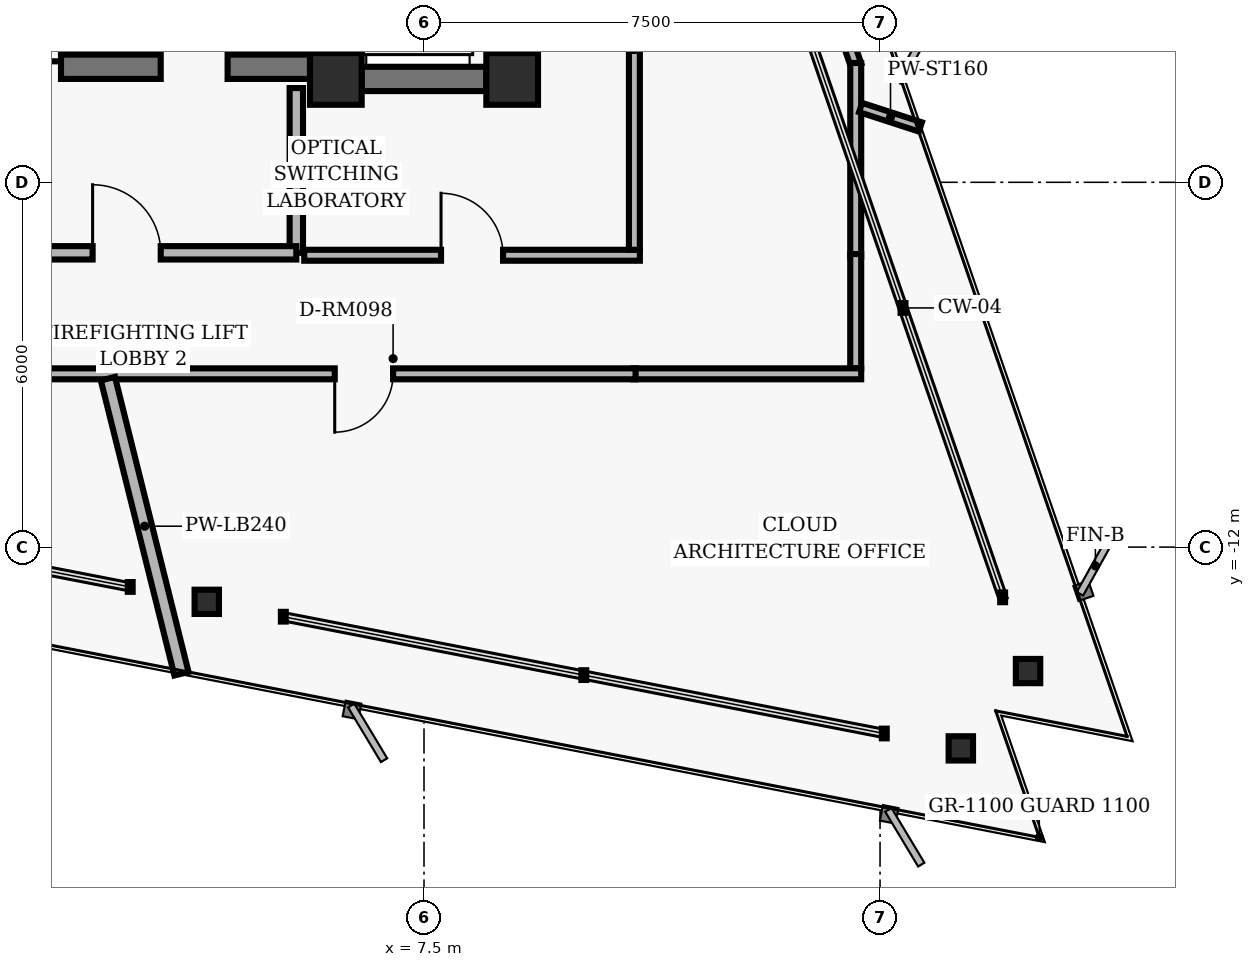
"""IFC4 building model, lengths in metres.
Left out: names, types, materials, properties, quantities, classifications, styles, units other than length and angle.
Written with IfcOpenShell. Run it as: python <this file> out.ifc"""

import sys

from ifc_helpers import new_model, si_unit, direction, frame, frame_2d, origin, origin_2d, place, context, subcontext, project, spatial, rectangle, hollow_rectangle, i_section, extrude, element, fill, save


model = new_model("IFC4")
c1 = context("Model", 3, precision=1e-05, world=origin(), true_north=direction((0.0, 1.0)))
c2 = subcontext(c1, "Body", "Model", "MODEL_VIEW")
j1 = project(units=[si_unit("LENGTHUNIT", "METRE"), si_unit("PLANEANGLEUNIT", "RADIAN")], contexts=[c1])
p1 = place(None, origin())
s1 = spatial("IfcSite", under=j1, at=p1, CompositionType="ELEMENT")
p2 = place(p1, origin())
s2 = spatial("IfcBuilding", under=s1, at=p2, CompositionType="ELEMENT")
p3 = place(p2, frame((0.0, 0.0, 147.2)))
s3 = spatial("IfcBuildingStorey", under=s2, at=p3, CompositionType="ELEMENT", Elevation=147.2)
for number, where, z_axis, x_axis in (
    (1, (6.05, -4.3, 0.0), (0.0, 0.0, 1.0), (1.0, 0.0, 0.0)),
    (2, (8.95, -4.3, 0.0), (0.0, 0.0, 1.0), (1.0, 0.0, 0.0)),
):
    element("IfcColumn", number, at=place(p3, frame(where, z_axis=z_axis, x_axis=x_axis)), inside=s3, PredefinedType="COLUMN", context=c2, shape_type="SweptSolid", body=[
        extrude(hollow_rectangle(XDim=0.85, YDim=0.85, WallThickness=0.055, InnerFilletRadius=0.02, OuterFilletRadius=0.04, at=origin_2d()), origin(), (0.0, 0.0, 1.0), 3.04),
    ])
p4 = place(p3, frame((6.05, -3.875, 0.0), z_axis=(0.0, 0.0, 1.0), x_axis=(0.0, 1.0, 0.0)))
e3 = element("IfcWall", 3, at=p4, inside=s3, PredefinedType="SHEAR", context=c2, shape_type="SweptSolid", body=[
    extrude(rectangle(XDim=3.45, YDim=0.6, at=frame_2d((1.725, 0.0))), origin(), (0.0, 0.0, 1.0), 2.788),
])
p5 = place(p3, frame((1.94, -4.1, 0.0), z_axis=(0.0, 0.0, 1.0), x_axis=(0.0, 1.0, 0.0)))
e4 = element("IfcWall", 4, at=p5, inside=s3, PredefinedType="SHEAR", context=c2, shape_type="SweptSolid", body=[
    extrude(rectangle(XDim=8.2, YDim=0.35, at=frame_2d((4.1, 0.0))), origin(), (0.0, 0.0, 1.0), 2.788),
])
p6 = place(p3, frame((-5.625, -4.1, 0.0), z_axis=(0.0, 0.0, 1.0), x_axis=(1.0, 0.0, 0.0)))
e5 = element("IfcWall", 5, at=p6, inside=s3, PredefinedType="SHEAR", context=c2, shape_type="SweptSolid", body=[
    extrude(rectangle(XDim=11.25, YDim=0.4, at=frame_2d((5.625, 0.0))), origin(), (0.0, 0.0, 1.0), 2.788),
])
p7 = place(p6, frame((1.355, 0.0, 0.0)))
e6 = element("IfcOpeningElement", 6, at=p7, cuts=e5, PredefinedType="OPENING", context=c2, shape_type="SweptSolid", body=[
    extrude(rectangle(XDim=1.1, YDim=2.04, at=frame_2d((0.55, 1.02))), frame((0.0, 0.21, 0.0), z_axis=(0.0, -1.0, 0.0), x_axis=(1.0, 0.0, 0.0)), (0.0, 0.0, 1.0), 0.42),
])
p8 = place(p6, frame((8.795, 0.0, 0.0)))
e7 = element("IfcOpeningElement", 7, at=p8, cuts=e5, PredefinedType="OPENING", context=c2, shape_type="SweptSolid", body=[
    extrude(rectangle(XDim=1.1, YDim=2.04, at=frame_2d((0.55, 1.02))), frame((0.0, 0.21, 0.0), z_axis=(0.0, -1.0, 0.0), x_axis=(1.0, 0.0, 0.0)), (0.0, 0.0, 1.0), 0.42),
])
p9 = place(p6, frame((4.095, 0.0, 0.0)))
e8 = element("IfcOpeningElement", 8, at=p9, cuts=e5, PredefinedType="OPENING", context=c2, shape_type="SweptSolid", body=[
    extrude(rectangle(XDim=1.06, YDim=2.04, at=frame_2d((0.53, 1.02))), frame((0.0, 0.21, 0.0), z_axis=(0.0, -1.0, 0.0), x_axis=(1.0, 0.0, 0.0)), (0.0, 0.0, 1.0), 0.42),
])
p10 = place(p6, frame((6.095, 0.0, 0.0)))
e9 = element("IfcOpeningElement", 9, at=p10, cuts=e5, PredefinedType="OPENING", context=c2, shape_type="SweptSolid", body=[
    extrude(rectangle(XDim=1.06, YDim=2.04, at=frame_2d((0.53, 1.02))), frame((0.0, 0.21, 0.0), z_axis=(0.0, -1.0, 0.0), x_axis=(1.0, 0.0, 0.0)), (0.0, 0.0, 1.0), 0.42),
])
p11 = place(p3, frame((8.95, -3.875, 0.0), z_axis=(0.0, 0.0, 1.0), x_axis=(0.0, 1.0, 0.0)))
e10 = element("IfcWall", 10, at=p11, inside=s3, PredefinedType="SHEAR", context=c2, shape_type="SweptSolid", body=[
    extrude(rectangle(XDim=7.95, YDim=0.6, at=frame_2d((3.975, 0.0))), origin(), (0.0, 0.0, 1.0), 2.788),
])
p12 = place(p11, frame((0.55, 0.0, 0.0)))
e11 = element("IfcOpeningElement", 11, at=p12, cuts=e10, PredefinedType="OPENING", context=c2, shape_type="SweptSolid", body=[
    extrude(rectangle(XDim=1.06, YDim=2.04, at=frame_2d((0.53, 1.02))), frame((0.0, 0.31, 0.0), z_axis=(0.0, -1.0, 0.0), x_axis=(1.0, 0.0, 0.0)), (0.0, 0.0, 1.0), 0.62),
])
p13 = place(p11, frame((3.445, 0.0, 0.0)))
e12 = element("IfcOpeningElement", 12, at=p13, cuts=e10, PredefinedType="OPENING", context=c2, shape_type="SweptSolid", body=[
    extrude(rectangle(XDim=1.06, YDim=2.04, at=frame_2d((0.53, 1.02))), frame((0.0, 0.31, 0.0), z_axis=(0.0, -1.0, 0.0), x_axis=(1.0, 0.0, 0.0)), (0.0, 0.0, 1.0), 0.62),
])
p14 = place(p11, frame((6.33, 0.0, 0.0)))
e13 = element("IfcOpeningElement", 13, at=p14, cuts=e10, PredefinedType="OPENING", context=c2, shape_type="SweptSolid", body=[
    extrude(rectangle(XDim=1.06, YDim=2.04, at=frame_2d((0.53, 1.02))), frame((0.0, 0.31, 0.0), z_axis=(0.0, -1.0, 0.0), x_axis=(1.0, 0.0, 0.0)), (0.0, 0.0, 1.0), 0.62),
])
p15 = place(p3, frame((6.475, -4.3, 0.0), z_axis=(0.0, 0.0, 1.0), x_axis=(1.0, 0.0, 0.0)))
e14 = element("IfcWall", 14, at=p15, inside=s3, PredefinedType="SHEAR", context=c2, shape_type="SweptSolid", body=[
    extrude(rectangle(XDim=2.05, YDim=0.4, at=frame_2d((1.025, 0.0))), origin(), (0.0, 0.0, 1.0), 2.788),
])
for number, where, z_axis, x_axis in (
    (15, (17.434, -14.039, 0.0), (0.0, 0.0, 1.0), (1.0, 0.0, 0.0)),
    (16, (3.927, -12.9, 0.0), (0.0, 0.0, 1.0), (1.0, 0.0, 0.0)),
    (17, (16.329, -15.311, 0.0), (0.0, 0.0, 1.0), (1.0, 0.0, 0.0)),
):
    element("IfcColumn", number, at=place(p3, frame(where, z_axis=z_axis, x_axis=x_axis)), inside=s3, PredefinedType="COLUMN", context=c2, shape_type="SweptSolid", body=[
        extrude(i_section(OverallWidth=0.401, OverallDepth=0.399, WebThickness=0.025, FlangeThickness=0.04, FilletRadius=0.018, at=origin_2d()), origin(), (0.0, 0.0, 1.0), 3.04),
    ])
p16 = place(p3, frame((5.4, -7.16, 0.0), z_axis=(0.0, 0.0, 1.0), x_axis=(0.0, 1.0, 0.0)))
e18 = element("IfcWall", 18, at=p16, inside=s3, PredefinedType="PARTITIONING", context=c2, shape_type="SweptSolid", body=[
    extrude(rectangle(XDim=2.71, YDim=0.22, at=frame_2d((1.355, 0.0))), origin(), (0.0, 0.0, 1.0), 2.763),
])
p17 = place(p3, frame((0.0, -7.16, 0.0), z_axis=(0.0, 0.0, 1.0), x_axis=(1.0, 0.0, 0.0)))
e19 = element("IfcWall", 19, at=p17, inside=s3, PredefinedType="PARTITIONING", context=c2, shape_type="SweptSolid", body=[
    extrude(rectangle(XDim=5.4, YDim=0.22, at=frame_2d((2.7, 0.0))), origin(), (0.0, 0.0, 1.0), 2.33),
])
p18 = place(p17, frame((2.05, 0.0, 0.0)))
e20 = element("IfcOpeningElement", 20, at=p18, cuts=e19, PredefinedType="OPENING", context=c2, shape_type="SweptSolid", body=[
    extrude(rectangle(XDim=1.12, YDim=2.02, at=frame_2d((0.56, 1.01))), frame((0.0, 0.12, 0.0), z_axis=(0.0, -1.0, 0.0), x_axis=(1.0, 0.0, 0.0)), (0.0, 0.0, 1.0), 0.24),
])
p19 = place(p3, frame((5.53, -7.2, 0.0), z_axis=(0.0, 0.0, 1.0), x_axis=(1.0, 0.0, 0.0)))
e21 = element("IfcWall", 21, at=p19, inside=s3, PredefinedType="PARTITIONING", context=c2, shape_type="SweptSolid", body=[
    extrude(rectangle(XDim=5.52, YDim=0.18, at=frame_2d((2.76, 0.0))), origin(), (0.0, 0.0, 1.0), 2.33),
])
p20 = place(p19, frame((2.25, 0.0, 0.0)))
e22 = element("IfcOpeningElement", 22, at=p20, cuts=e21, PredefinedType="OPENING", context=c2, shape_type="SweptSolid", body=[
    extrude(rectangle(XDim=1.02, YDim=2.02, at=frame_2d((0.51, 1.01))), frame((0.0, 0.1, 0.0), z_axis=(0.0, -1.0, 0.0), x_axis=(1.0, 0.0, 0.0)), (0.0, 0.0, 1.0), 0.2),
])
p21 = place(p3, frame((10.96, -7.11, 0.0), z_axis=(0.0, 0.0, 1.0), x_axis=(0.0, 1.0, 0.0)))
e23 = element("IfcWall", 23, at=p21, inside=s3, PredefinedType="PARTITIONING", context=c2, shape_type="SweptSolid", body=[
    extrude(rectangle(XDim=3.271, YDim=0.18, at=frame_2d((1.635, 0.0))), origin(), (0.0, 0.0, 1.0), 2.763),
])
p22 = place(p3, frame((10.954, 6.533, 0.0), z_axis=(0.0, 0.0, 1.0), x_axis=(0.325553439946, -0.945523642084, 0.0)))
e24 = element("IfcWall", 24, at=p22, inside=s3, PredefinedType="PARTITIONING", context=c2, shape_type="SweptSolid", body=[
    extrude(rectangle(XDim=11.22, YDim=0.18, at=frame_2d((5.61, 0.0))), origin(), (0.0, 0.0, 1.0), 2.763),
])
p23 = place(p3, frame((14.6, -4.038, 0.0), z_axis=(0.0, 0.0, 1.0), x_axis=(0.0, -1.0, 0.0)))
e25 = element("IfcWall", 25, at=p23, inside=s3, PredefinedType="PARTITIONING", context=c2, shape_type="SweptSolid", body=[
    extrude(rectangle(XDim=3.182, YDim=0.18, at=frame_2d((1.591, 0.0))), origin(), (0.0, 0.0, 1.0), 2.763),
])
p24 = place(p3, frame((14.6, -7.18, 0.0), z_axis=(0.0, 0.0, 1.0), x_axis=(0.0, -1.0, 0.0)))
e26 = element("IfcWall", 26, at=p24, inside=s3, PredefinedType="PARTITIONING", context=c2, shape_type="SweptSolid", body=[
    extrude(rectangle(XDim=1.88, YDim=0.18, at=frame_2d((0.94, 0.0))), origin(), (0.0, 0.0, 1.0), 2.763),
])
p25 = place(p3, frame((14.69, -9.15, 0.0), z_axis=(0.0, 0.0, 1.0), x_axis=(-1.0, 0.0, 0.0)))
e27 = element("IfcWall", 27, at=p25, inside=s3, PredefinedType="PARTITIONING", context=c2, shape_type="SweptSolid", body=[
    extrude(rectangle(XDim=3.75, YDim=0.18, at=frame_2d((1.875, 0.0))), origin(), (0.0, 0.0, 1.0), 2.763),
])
p26 = place(p3, frame((10.98, -9.15, 0.0), z_axis=(0.0, 0.0, 1.0), x_axis=(-1.0, 0.0, 0.0)))
e28 = element("IfcWall", 28, at=p26, inside=s3, PredefinedType="PARTITIONING", context=c2, shape_type="SweptSolid", body=[
    extrude(rectangle(XDim=17.5, YDim=0.18, at=frame_2d((8.75, 0.0))), origin(), (0.0, 0.0, 1.0), 2.33),
])
p27 = place(p26, frame((12.48, 0.0, 0.0)))
e29 = element("IfcOpeningElement", 29, at=p27, cuts=e28, PredefinedType="OPENING", context=c2, shape_type="SweptSolid", body=[
    extrude(rectangle(XDim=0.96, YDim=2.02, at=frame_2d((0.48, 1.01))), frame((0.0, 0.1, 0.0), z_axis=(0.0, -1.0, 0.0), x_axis=(1.0, 0.0, 0.0)), (0.0, 0.0, 1.0), 0.2),
])
p28 = place(p26, frame((3.988, 0.0, 0.0)))
e30 = element("IfcOpeningElement", 30, at=p28, cuts=e28, PredefinedType="OPENING", context=c2, shape_type="SweptSolid", body=[
    extrude(rectangle(XDim=0.96, YDim=2.02, at=frame_2d((0.48, 1.01))), frame((0.0, 0.1, 0.0), z_axis=(0.0, -1.0, 0.0), x_axis=(1.0, 0.0, 0.0)), (0.0, 0.0, 1.0), 0.2),
])
p29 = place(p3, frame((2.301, -9.23, 0.0), z_axis=(0.0, 0.0, 1.0), x_axis=(0.241903783585, -0.970300241929, 0.0)))
e31 = element("IfcWall", 31, at=p29, inside=s3, PredefinedType="PARTITIONING", context=c2, shape_type="SweptSolid", body=[
    extrude(rectangle(XDim=5.001, YDim=0.24, at=frame_2d((2.5, 0.0))), origin(), (0.0, 0.0, 1.0), 2.763),
])
p30 = place(p3, frame((14.68, -4.77, 0.0), z_axis=(0.0, 0.0, 1.0), x_axis=(0.951039270022, -0.309070067906, 0.0)))
e32 = element("IfcWall", 32, at=p30, inside=s3, PredefinedType="PARTITIONING", context=c2, shape_type="SweptSolid", body=[
    extrude(rectangle(XDim=1.035, YDim=0.16, at=frame_2d((0.518, 0.0))), origin(), (0.0, 0.0, 1.0), 2.763),
])
p31 = place(p8, origin())
e33 = element("IfcDoor", 33, at=p31, inside=s3, OperationType="SINGLE_SWING_LEFT", PredefinedType="DOOR", context=c2, shape_type="SweptSolid", body=[
    extrude(rectangle(XDim=1.1, YDim=2.04, at=frame_2d((0.55, 1.02))), frame((0.0, 0.025, 0.0), z_axis=(0.0, -1.0, 0.0), x_axis=(1.0, 0.0, 0.0)), (0.0, 0.0, 1.0), 0.05),
])
fill(e7, e33)
p32 = place(p10, origin())
e34 = element("IfcDoor", 34, at=p32, inside=s3, OperationType="SLIDING_TO_RIGHT", PredefinedType="DOOR", context=c2, shape_type="SweptSolid", body=[
    extrude(rectangle(XDim=1.06, YDim=2.04, at=frame_2d((0.53, 1.02))), frame((0.0, 0.025, 0.0), z_axis=(0.0, -1.0, 0.0), x_axis=(1.0, 0.0, 0.0)), (0.0, 0.0, 1.0), 0.05),
])
fill(e9, e34)
p33 = place(p18, origin())
e35 = element("IfcDoor", 35, at=p33, inside=s3, OperationType="SINGLE_SWING_LEFT", PredefinedType="DOOR", context=c2, shape_type="SweptSolid", body=[
    extrude(rectangle(XDim=1.12, YDim=2.02, at=frame_2d((0.56, 1.01))), frame((0.0, 0.025, 0.0), z_axis=(0.0, -1.0, 0.0), x_axis=(1.0, 0.0, 0.0)), (0.0, 0.0, 1.0), 0.05),
])
fill(e20, e35)
p34 = place(p28, origin())
e36 = element("IfcDoor", 36, at=p34, inside=s3, OperationType="SINGLE_SWING_RIGHT", PredefinedType="DOOR", context=c2, shape_type="SweptSolid", body=[
    extrude(rectangle(XDim=0.96, YDim=2.02, at=frame_2d((0.48, 1.01))), frame((0.0, 0.025, 0.0), z_axis=(0.0, -1.0, 0.0), x_axis=(1.0, 0.0, 0.0)), (0.0, 0.0, 1.0), 0.05),
])
fill(e30, e36)
p35 = place(p20, origin())
e37 = element("IfcDoor", 37, at=p35, inside=s3, OperationType="SINGLE_SWING_LEFT", PredefinedType="DOOR", context=c2, shape_type="SweptSolid", body=[
    extrude(rectangle(XDim=1.02, YDim=2.02, at=frame_2d((0.51, 1.01))), frame((0.0, 0.025, 0.0), z_axis=(0.0, -1.0, 0.0), x_axis=(1.0, 0.0, 0.0)), (0.0, 0.0, 1.0), 0.05),
])
fill(e22, e37)
save(model, sys.argv[1])
